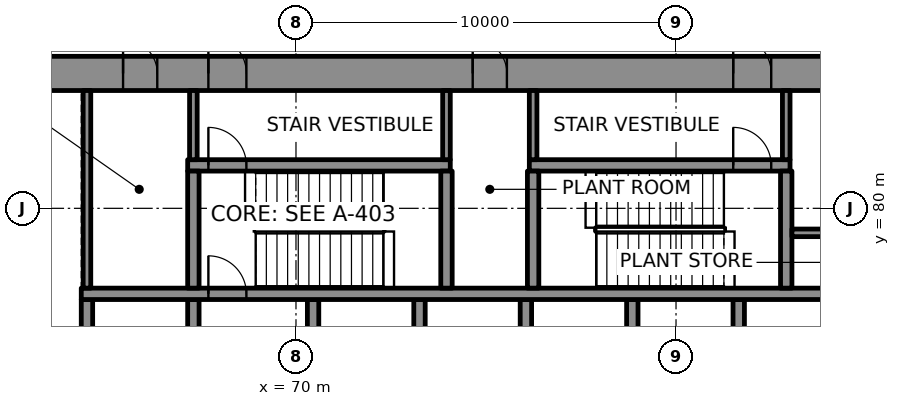
"""IFC4 building model, lengths in metres.
Left out: names, types, materials, properties, quantities, classifications, styles, units other than length and angle.
Written with IfcOpenShell. Run it as: python <this file> out.ifc"""

import sys

from ifc_helpers import new_model, si_unit, direction, frame, frame_2d, origin, place, context, subcontext, project, spatial, rectangle, extrude, element, fill, save


model = new_model("IFC4")
c1 = context("Model", 3, precision=1e-05, world=origin(), true_north=direction((0.0, 1.0)))
c2 = subcontext(c1, "Body", "Model", "MODEL_VIEW")
j1 = project(units=[si_unit("LENGTHUNIT", "METRE"), si_unit("PLANEANGLEUNIT", "RADIAN")], contexts=[c1])
p1 = place(None, origin())
s1 = spatial("IfcSite", under=j1, at=p1, CompositionType="ELEMENT")
p2 = place(p1, origin())
s2 = spatial("IfcBuilding", under=s1, at=p2, CompositionType="ELEMENT")
p3 = place(p2, frame((0.0, 0.0, 35.5)))
s3 = spatial("IfcBuildingStorey", under=s2, at=p3, CompositionType="ELEMENT", Elevation=35.5)
p4 = place(p3, frame((62.0, 83.55, 0.0), z_axis=(0.0, 0.0, 1.0), x_axis=(1.0, 0.0, 0.0)))
e1 = element("IfcWall", 1, at=p4, inside=s3, PredefinedType="SHEAR", context=c2, shape_type="SweptSolid", body=[
    extrude(rectangle(XDim=26.0, YDim=0.9, at=frame_2d((13.0, 0.0))), origin(), (0.0, 0.0, 1.0), 4.3),
])
p5 = place(p4, frame((5.695, 0.0, 0.0)))
e2 = element("IfcOpeningElement", 2, at=p5, cuts=e1, PredefinedType="OPENING", context=c2, shape_type="SweptSolid", body=[
    extrude(rectangle(XDim=1.0, YDim=2.1, at=frame_2d((0.5, 1.05))), frame((0.0, 0.46, 0.0), z_axis=(0.0, -1.0, 0.0), x_axis=(1.0, 0.0, 0.0)), (0.0, 0.0, 1.0), 0.92),
])
p6 = place(p4, frame((19.505, 0.0, 0.0)))
e3 = element("IfcOpeningElement", 3, at=p6, cuts=e1, PredefinedType="OPENING", context=c2, shape_type="SweptSolid", body=[
    extrude(rectangle(XDim=1.0, YDim=2.1, at=frame_2d((0.5, 1.05))), frame((0.0, 0.46, 0.0), z_axis=(0.0, -1.0, 0.0), x_axis=(1.0, 0.0, 0.0)), (0.0, 0.0, 1.0), 0.92),
])
p7 = place(p4, frame((3.45, 0.0, 0.0)))
e4 = element("IfcOpeningElement", 4, at=p7, cuts=e1, PredefinedType="OPENING", context=c2, shape_type="SweptSolid", body=[
    extrude(rectangle(XDim=0.9, YDim=2.1, at=frame_2d((0.45, 1.05))), frame((0.0, 0.46, 0.0), z_axis=(0.0, -1.0, 0.0), x_axis=(1.0, 0.0, 0.0)), (0.0, 0.0, 1.0), 0.92),
])
p8 = place(p4, frame((12.65, 0.0, 0.0)))
e5 = element("IfcOpeningElement", 5, at=p8, cuts=e1, PredefinedType="OPENING", context=c2, shape_type="SweptSolid", body=[
    extrude(rectangle(XDim=0.9, YDim=2.1, at=frame_2d((0.45, 1.05))), frame((0.0, 0.46, 0.0), z_axis=(0.0, -1.0, 0.0), x_axis=(1.0, 0.0, 0.0)), (0.0, 0.0, 1.0), 0.92),
])
p9 = place(p4, frame((22.55, 0.0, 0.0)))
e6 = element("IfcOpeningElement", 6, at=p9, cuts=e1, PredefinedType="OPENING", context=c2, shape_type="SweptSolid", body=[
    extrude(rectangle(XDim=0.9, YDim=2.1, at=frame_2d((0.45, 1.05))), frame((0.0, 0.46, 0.0), z_axis=(0.0, -1.0, 0.0), x_axis=(1.0, 0.0, 0.0)), (0.0, 0.0, 1.0), 0.92),
])
for number, where, z_axis, x_axis in (
    (7, (64.5, 75.0, 0.0), (0.0, 0.0, 1.0), (0.0, 1.0, 0.0)),
    (8, (67.3, 75.0, 0.0), (0.0, 0.0, 1.0), (0.0, 1.0, 0.0)),
):
    element("IfcWall", number, at=place(p3, frame(where, z_axis=z_axis, x_axis=x_axis)), inside=s3, PredefinedType="SHEAR", context=c2, shape_type="SweptSolid", body=[
        extrude(rectangle(XDim=2.6, YDim=0.3, at=frame_2d((1.3, 0.0))), origin(), (0.0, 0.0, 1.0), 4.3),
    ])
p10 = place(p3, frame((70.45, 75.0, 0.0), z_axis=(0.0, 0.0, 1.0), x_axis=(0.0, 1.0, 0.0)))
e9 = element("IfcWall", 9, at=p10, inside=s3, PredefinedType="SHEAR", context=c2, shape_type="SweptSolid", body=[
    extrude(rectangle(XDim=2.6, YDim=0.3, at=frame_2d((1.3, 0.0))), origin(), (0.0, 0.0, 1.0), 4.3),
])
p11 = place(p10, frame((0.15, 0.0, 0.0)))
e10 = element("IfcOpeningElement", 10, at=p11, cuts=e9, PredefinedType="OPENING", context=c2, shape_type="SweptSolid", body=[
    extrude(rectangle(XDim=1.1, YDim=2.1, at=frame_2d((0.55, 1.05))), frame((0.0, 0.16, 0.0), z_axis=(0.0, -1.0, 0.0), x_axis=(1.0, 0.0, 0.0)), (0.0, 0.0, 1.0), 0.32),
])
for number, where, z_axis, x_axis in (
    (11, (73.25, 75.0, 0.0), (0.0, 0.0, 1.0), (0.0, 1.0, 0.0)),
    (12, (76.05, 75.0, 0.0), (0.0, 0.0, 1.0), (0.0, 1.0, 0.0)),
    (13, (78.85, 75.0, 0.0), (0.0, 0.0, 1.0), (0.0, 1.0, 0.0)),
    (14, (81.65, 75.0, 0.0), (0.0, 0.0, 1.0), (0.0, 1.0, 0.0)),
):
    element("IfcWall", number, at=place(p3, frame(where, z_axis=z_axis, x_axis=x_axis)), inside=s3, PredefinedType="SHEAR", context=c2, shape_type="SweptSolid", body=[
        extrude(rectangle(XDim=2.6, YDim=0.3, at=frame_2d((1.3, 0.0))), origin(), (0.0, 0.0, 1.0), 4.3),
    ])
p12 = place(p3, frame((64.35, 77.75, 0.0), z_axis=(0.0, 0.0, 1.0), x_axis=(1.0, 0.0, 0.0)))
e15 = element("IfcWall", 15, at=p12, inside=s3, PredefinedType="SHEAR", context=c2, shape_type="SweptSolid", body=[
    extrude(rectangle(XDim=22.75, YDim=0.3, at=frame_2d((11.375, 0.0))), origin(), (0.0, 0.0, 1.0), 4.3),
])
p13 = place(p12, frame((3.345, 0.0, 0.0)))
e16 = element("IfcOpeningElement", 16, at=p13, cuts=e15, PredefinedType="OPENING", context=c2, shape_type="SweptSolid", body=[
    extrude(rectangle(XDim=1.0, YDim=2.1, at=frame_2d((0.5, 1.05))), frame((0.0, 0.16, 0.0), z_axis=(0.0, -1.0, 0.0), x_axis=(1.0, 0.0, 0.0)), (0.0, 0.0, 1.0), 0.32),
])
p14 = place(p3, frame((67.15, 81.13, 0.0), z_axis=(0.0, 0.0, 1.0), x_axis=(1.0, 0.0, 0.0)))
e17 = element("IfcWall", 17, at=p14, inside=s3, PredefinedType="SHEAR", context=c2, shape_type="SweptSolid", body=[
    extrude(rectangle(XDim=6.91, YDim=0.3, at=frame_2d((3.455, 0.0))), origin(), (0.0, 0.0, 1.0), 4.3),
])
p15 = place(p14, frame((0.545, 0.0, 0.0)))
e18 = element("IfcOpeningElement", 18, at=p15, cuts=e17, PredefinedType="OPENING", context=c2, shape_type="SweptSolid", body=[
    extrude(rectangle(XDim=1.0, YDim=2.1, at=frame_2d((0.5, 1.05))), frame((0.0, 0.16, 0.0), z_axis=(0.0, -1.0, 0.0), x_axis=(1.0, 0.0, 0.0)), (0.0, 0.0, 1.0), 0.32),
])
p16 = place(p3, frame((76.14, 81.13, 0.0), z_axis=(0.0, 0.0, 1.0), x_axis=(1.0, 0.0, 0.0)))
e19 = element("IfcWall", 19, at=p16, inside=s3, PredefinedType="SHEAR", context=c2, shape_type="SweptSolid", body=[
    extrude(rectangle(XDim=6.86, YDim=0.3, at=frame_2d((3.43, 0.0))), origin(), (0.0, 0.0, 1.0), 4.3),
])
p17 = place(p16, frame((5.365, 0.0, 0.0)))
e20 = element("IfcOpeningElement", 20, at=p17, cuts=e19, PredefinedType="OPENING", context=c2, shape_type="SweptSolid", body=[
    extrude(rectangle(XDim=1.0, YDim=2.1, at=frame_2d((0.5, 1.05))), frame((0.0, 0.16, 0.0), z_axis=(0.0, -1.0, 0.0), x_axis=(1.0, 0.0, 0.0)), (0.0, 0.0, 1.0), 0.32),
])
for number, where, z_axis, x_axis in (
    (21, (67.3, 77.9, 0.0), (0.0, 0.0, 1.0), (0.0, 1.0, 0.0)),
    (22, (73.96, 77.9, 0.0), (0.0, 0.0, 1.0), (0.0, 1.0, 0.0)),
    (23, (76.24, 77.9, 0.0), (0.0, 0.0, 1.0), (0.0, 1.0, 0.0)),
    (24, (82.9, 77.9, 0.0), (0.0, 0.0, 1.0), (0.0, 1.0, 0.0)),
):
    element("IfcWall", number, at=place(p3, frame(where, z_axis=z_axis, x_axis=x_axis)), inside=s3, PredefinedType="SHEAR", context=c2, shape_type="SweptSolid", body=[
        extrude(rectangle(XDim=3.08, YDim=0.3, at=frame_2d((1.54, 0.0))), origin(), (0.0, 0.0, 1.0), 4.3),
    ])
p18 = place(p3, frame((107.504, 60.451, 0.0), z_axis=(0.0, 0.0, 1.0), x_axis=(-0.500000550228, 0.86602508611, 0.0)))
e25 = element("IfcWall", 25, at=p18, inside=s3, PredefinedType="SOLIDWALL", context=c2, shape_type="SweptSolid", body=[
    extrude(rectangle(XDim=57.704, YDim=0.3, at=frame_2d((28.852, 0.0))), origin(), (0.0, 0.0, 1.0), 4.3),
])
p19 = place(p18, frame((0.89, 0.0, 0.8)))
e26 = element("IfcOpeningElement", 26, at=p19, cuts=e25, PredefinedType="OPENING", context=c2, shape_type="SweptSolid", body=[
    extrude(rectangle(XDim=3.0, YDim=2.4, at=frame_2d((1.5, 1.2))), frame((0.0, 0.16, 0.0), z_axis=(0.0, -1.0, 0.0), x_axis=(1.0, 0.0, 0.0)), (0.0, 0.0, 1.0), 0.32),
])
p20 = place(p18, frame((4.67, 0.0, 0.8)))
e27 = element("IfcOpeningElement", 27, at=p20, cuts=e25, PredefinedType="OPENING", context=c2, shape_type="SweptSolid", body=[
    extrude(rectangle(XDim=3.0, YDim=2.4, at=frame_2d((1.5, 1.2))), frame((0.0, 0.16, 0.0), z_axis=(0.0, -1.0, 0.0), x_axis=(1.0, 0.0, 0.0)), (0.0, 0.0, 1.0), 0.32),
])
p21 = place(p18, frame((8.451, 0.0, 0.8)))
e28 = element("IfcOpeningElement", 28, at=p21, cuts=e25, PredefinedType="OPENING", context=c2, shape_type="SweptSolid", body=[
    extrude(rectangle(XDim=3.0, YDim=2.4, at=frame_2d((1.5, 1.2))), frame((0.0, 0.16, 0.0), z_axis=(0.0, -1.0, 0.0), x_axis=(1.0, 0.0, 0.0)), (0.0, 0.0, 1.0), 0.32),
])
p22 = place(p18, frame((12.231, 0.0, 0.8)))
e29 = element("IfcOpeningElement", 29, at=p22, cuts=e25, PredefinedType="OPENING", context=c2, shape_type="SweptSolid", body=[
    extrude(rectangle(XDim=3.0, YDim=2.4, at=frame_2d((1.5, 1.2))), frame((0.0, 0.16, 0.0), z_axis=(0.0, -1.0, 0.0), x_axis=(1.0, 0.0, 0.0)), (0.0, 0.0, 1.0), 0.32),
])
p23 = place(p18, frame((16.011, 0.0, 0.8)))
e30 = element("IfcOpeningElement", 30, at=p23, cuts=e25, PredefinedType="OPENING", context=c2, shape_type="SweptSolid", body=[
    extrude(rectangle(XDim=3.0, YDim=2.4, at=frame_2d((1.5, 1.2))), frame((0.0, 0.16, 0.0), z_axis=(0.0, -1.0, 0.0), x_axis=(1.0, 0.0, 0.0)), (0.0, 0.0, 1.0), 0.32),
])
p24 = place(p18, frame((19.792, 0.0, 0.8)))
e31 = element("IfcOpeningElement", 31, at=p24, cuts=e25, PredefinedType="OPENING", context=c2, shape_type="SweptSolid", body=[
    extrude(rectangle(XDim=3.0, YDim=2.4, at=frame_2d((1.5, 1.2))), frame((0.0, 0.16, 0.0), z_axis=(0.0, -1.0, 0.0), x_axis=(1.0, 0.0, 0.0)), (0.0, 0.0, 1.0), 0.32),
])
p25 = place(p18, frame((23.572, 0.0, 0.8)))
e32 = element("IfcOpeningElement", 32, at=p25, cuts=e25, PredefinedType="OPENING", context=c2, shape_type="SweptSolid", body=[
    extrude(rectangle(XDim=3.0, YDim=2.4, at=frame_2d((1.5, 1.2))), frame((0.0, 0.16, 0.0), z_axis=(0.0, -1.0, 0.0), x_axis=(1.0, 0.0, 0.0)), (0.0, 0.0, 1.0), 0.32),
])
p26 = place(p18, frame((27.352, 0.0, 0.8)))
e33 = element("IfcOpeningElement", 33, at=p26, cuts=e25, PredefinedType="OPENING", context=c2, shape_type="SweptSolid", body=[
    extrude(rectangle(XDim=3.0, YDim=2.4, at=frame_2d((1.5, 1.2))), frame((0.0, 0.16, 0.0), z_axis=(0.0, -1.0, 0.0), x_axis=(1.0, 0.0, 0.0)), (0.0, 0.0, 1.0), 0.32),
])
p27 = place(p18, frame((31.132, 0.0, 0.8)))
e34 = element("IfcOpeningElement", 34, at=p27, cuts=e25, PredefinedType="OPENING", context=c2, shape_type="SweptSolid", body=[
    extrude(rectangle(XDim=3.0, YDim=2.4, at=frame_2d((1.5, 1.2))), frame((0.0, 0.16, 0.0), z_axis=(0.0, -1.0, 0.0), x_axis=(1.0, 0.0, 0.0)), (0.0, 0.0, 1.0), 0.32),
])
p28 = place(p18, frame((34.913, 0.0, 0.8)))
e35 = element("IfcOpeningElement", 35, at=p28, cuts=e25, PredefinedType="OPENING", context=c2, shape_type="SweptSolid", body=[
    extrude(rectangle(XDim=3.0, YDim=2.4, at=frame_2d((1.5, 1.2))), frame((0.0, 0.16, 0.0), z_axis=(0.0, -1.0, 0.0), x_axis=(1.0, 0.0, 0.0)), (0.0, 0.0, 1.0), 0.32),
])
p29 = place(p18, frame((38.693, 0.0, 0.8)))
e36 = element("IfcOpeningElement", 36, at=p29, cuts=e25, PredefinedType="OPENING", context=c2, shape_type="SweptSolid", body=[
    extrude(rectangle(XDim=3.0, YDim=2.4, at=frame_2d((1.5, 1.2))), frame((0.0, 0.16, 0.0), z_axis=(0.0, -1.0, 0.0), x_axis=(1.0, 0.0, 0.0)), (0.0, 0.0, 1.0), 0.32),
])
p30 = place(p18, frame((42.473, 0.0, 0.8)))
e37 = element("IfcOpeningElement", 37, at=p30, cuts=e25, PredefinedType="OPENING", context=c2, shape_type="SweptSolid", body=[
    extrude(rectangle(XDim=3.0, YDim=2.4, at=frame_2d((1.5, 1.2))), frame((0.0, 0.16, 0.0), z_axis=(0.0, -1.0, 0.0), x_axis=(1.0, 0.0, 0.0)), (0.0, 0.0, 1.0), 0.32),
])
p31 = place(p18, frame((46.253, 0.0, 0.8)))
e38 = element("IfcOpeningElement", 38, at=p31, cuts=e25, PredefinedType="OPENING", context=c2, shape_type="SweptSolid", body=[
    extrude(rectangle(XDim=3.0, YDim=2.4, at=frame_2d((1.5, 1.2))), frame((0.0, 0.16, 0.0), z_axis=(0.0, -1.0, 0.0), x_axis=(1.0, 0.0, 0.0)), (0.0, 0.0, 1.0), 0.32),
])
p32 = place(p18, frame((50.033, 0.0, 0.8)))
e39 = element("IfcOpeningElement", 39, at=p32, cuts=e25, PredefinedType="OPENING", context=c2, shape_type="SweptSolid", body=[
    extrude(rectangle(XDim=3.0, YDim=2.4, at=frame_2d((1.5, 1.2))), frame((0.0, 0.16, 0.0), z_axis=(0.0, -1.0, 0.0), x_axis=(1.0, 0.0, 0.0)), (0.0, 0.0, 1.0), 0.32),
])
p33 = place(p18, frame((53.814, 0.0, 0.8)))
e40 = element("IfcOpeningElement", 40, at=p33, cuts=e25, PredefinedType="OPENING", context=c2, shape_type="SweptSolid", body=[
    extrude(rectangle(XDim=3.0, YDim=2.4, at=frame_2d((1.5, 1.2))), frame((0.0, 0.16, 0.0), z_axis=(0.0, -1.0, 0.0), x_axis=(1.0, 0.0, 0.0)), (0.0, 0.0, 1.0), 0.32),
])
p34 = place(p3, frame((71.348, 110.424, 0.0), z_axis=(0.0, 0.0, 1.0), x_axis=(-0.500000550228, -0.86602508611, 0.0)))
e41 = element("IfcWall", 41, at=p34, inside=s3, PredefinedType="SOLIDWALL", context=c2, shape_type="SweptSolid", body=[
    extrude(rectangle(XDim=57.704, YDim=0.3, at=frame_2d((28.852, 0.0))), origin(), (0.0, 0.0, 1.0), 4.3),
])
p35 = place(p34, frame((0.89, 0.0, 0.8)))
e42 = element("IfcOpeningElement", 42, at=p35, cuts=e41, PredefinedType="OPENING", context=c2, shape_type="SweptSolid", body=[
    extrude(rectangle(XDim=3.0, YDim=2.4, at=frame_2d((1.5, 1.2))), frame((0.0, 0.16, 0.0), z_axis=(0.0, -1.0, 0.0), x_axis=(1.0, 0.0, 0.0)), (0.0, 0.0, 1.0), 0.32),
])
p36 = place(p34, frame((4.67, 0.0, 0.8)))
e43 = element("IfcOpeningElement", 43, at=p36, cuts=e41, PredefinedType="OPENING", context=c2, shape_type="SweptSolid", body=[
    extrude(rectangle(XDim=3.0, YDim=2.4, at=frame_2d((1.5, 1.2))), frame((0.0, 0.16, 0.0), z_axis=(0.0, -1.0, 0.0), x_axis=(1.0, 0.0, 0.0)), (0.0, 0.0, 1.0), 0.32),
])
p37 = place(p34, frame((8.451, 0.0, 0.8)))
e44 = element("IfcOpeningElement", 44, at=p37, cuts=e41, PredefinedType="OPENING", context=c2, shape_type="SweptSolid", body=[
    extrude(rectangle(XDim=3.0, YDim=2.4, at=frame_2d((1.5, 1.2))), frame((0.0, 0.16, 0.0), z_axis=(0.0, -1.0, 0.0), x_axis=(1.0, 0.0, 0.0)), (0.0, 0.0, 1.0), 0.32),
])
p38 = place(p34, frame((12.231, 0.0, 0.8)))
e45 = element("IfcOpeningElement", 45, at=p38, cuts=e41, PredefinedType="OPENING", context=c2, shape_type="SweptSolid", body=[
    extrude(rectangle(XDim=3.0, YDim=2.4, at=frame_2d((1.5, 1.2))), frame((0.0, 0.16, 0.0), z_axis=(0.0, -1.0, 0.0), x_axis=(1.0, 0.0, 0.0)), (0.0, 0.0, 1.0), 0.32),
])
p39 = place(p34, frame((16.011, 0.0, 0.8)))
e46 = element("IfcOpeningElement", 46, at=p39, cuts=e41, PredefinedType="OPENING", context=c2, shape_type="SweptSolid", body=[
    extrude(rectangle(XDim=3.0, YDim=2.4, at=frame_2d((1.5, 1.2))), frame((0.0, 0.16, 0.0), z_axis=(0.0, -1.0, 0.0), x_axis=(1.0, 0.0, 0.0)), (0.0, 0.0, 1.0), 0.32),
])
p40 = place(p34, frame((19.792, 0.0, 0.8)))
e47 = element("IfcOpeningElement", 47, at=p40, cuts=e41, PredefinedType="OPENING", context=c2, shape_type="SweptSolid", body=[
    extrude(rectangle(XDim=3.0, YDim=2.4, at=frame_2d((1.5, 1.2))), frame((0.0, 0.16, 0.0), z_axis=(0.0, -1.0, 0.0), x_axis=(1.0, 0.0, 0.0)), (0.0, 0.0, 1.0), 0.32),
])
p41 = place(p34, frame((23.572, 0.0, 0.8)))
e48 = element("IfcOpeningElement", 48, at=p41, cuts=e41, PredefinedType="OPENING", context=c2, shape_type="SweptSolid", body=[
    extrude(rectangle(XDim=3.0, YDim=2.4, at=frame_2d((1.5, 1.2))), frame((0.0, 0.16, 0.0), z_axis=(0.0, -1.0, 0.0), x_axis=(1.0, 0.0, 0.0)), (0.0, 0.0, 1.0), 0.32),
])
p42 = place(p34, frame((27.352, 0.0, 0.8)))
e49 = element("IfcOpeningElement", 49, at=p42, cuts=e41, PredefinedType="OPENING", context=c2, shape_type="SweptSolid", body=[
    extrude(rectangle(XDim=3.0, YDim=2.4, at=frame_2d((1.5, 1.2))), frame((0.0, 0.16, 0.0), z_axis=(0.0, -1.0, 0.0), x_axis=(1.0, 0.0, 0.0)), (0.0, 0.0, 1.0), 0.32),
])
p43 = place(p34, frame((31.132, 0.0, 0.8)))
e50 = element("IfcOpeningElement", 50, at=p43, cuts=e41, PredefinedType="OPENING", context=c2, shape_type="SweptSolid", body=[
    extrude(rectangle(XDim=3.0, YDim=2.4, at=frame_2d((1.5, 1.2))), frame((0.0, 0.16, 0.0), z_axis=(0.0, -1.0, 0.0), x_axis=(1.0, 0.0, 0.0)), (0.0, 0.0, 1.0), 0.32),
])
p44 = place(p34, frame((34.913, 0.0, 0.8)))
e51 = element("IfcOpeningElement", 51, at=p44, cuts=e41, PredefinedType="OPENING", context=c2, shape_type="SweptSolid", body=[
    extrude(rectangle(XDim=3.0, YDim=2.4, at=frame_2d((1.5, 1.2))), frame((0.0, 0.16, 0.0), z_axis=(0.0, -1.0, 0.0), x_axis=(1.0, 0.0, 0.0)), (0.0, 0.0, 1.0), 0.32),
])
p45 = place(p34, frame((38.693, 0.0, 0.8)))
e52 = element("IfcOpeningElement", 52, at=p45, cuts=e41, PredefinedType="OPENING", context=c2, shape_type="SweptSolid", body=[
    extrude(rectangle(XDim=3.0, YDim=2.4, at=frame_2d((1.5, 1.2))), frame((0.0, 0.16, 0.0), z_axis=(0.0, -1.0, 0.0), x_axis=(1.0, 0.0, 0.0)), (0.0, 0.0, 1.0), 0.32),
])
p46 = place(p34, frame((42.473, 0.0, 0.8)))
e53 = element("IfcOpeningElement", 53, at=p46, cuts=e41, PredefinedType="OPENING", context=c2, shape_type="SweptSolid", body=[
    extrude(rectangle(XDim=3.0, YDim=2.4, at=frame_2d((1.5, 1.2))), frame((0.0, 0.16, 0.0), z_axis=(0.0, -1.0, 0.0), x_axis=(1.0, 0.0, 0.0)), (0.0, 0.0, 1.0), 0.32),
])
p47 = place(p34, frame((46.253, 0.0, 0.8)))
e54 = element("IfcOpeningElement", 54, at=p47, cuts=e41, PredefinedType="OPENING", context=c2, shape_type="SweptSolid", body=[
    extrude(rectangle(XDim=3.0, YDim=2.4, at=frame_2d((1.5, 1.2))), frame((0.0, 0.16, 0.0), z_axis=(0.0, -1.0, 0.0), x_axis=(1.0, 0.0, 0.0)), (0.0, 0.0, 1.0), 0.32),
])
p48 = place(p34, frame((50.033, 0.0, 0.8)))
e55 = element("IfcOpeningElement", 55, at=p48, cuts=e41, PredefinedType="OPENING", context=c2, shape_type="SweptSolid", body=[
    extrude(rectangle(XDim=3.0, YDim=2.4, at=frame_2d((1.5, 1.2))), frame((0.0, 0.16, 0.0), z_axis=(0.0, -1.0, 0.0), x_axis=(1.0, 0.0, 0.0)), (0.0, 0.0, 1.0), 0.32),
])
p49 = place(p34, frame((53.814, 0.0, 0.8)))
e56 = element("IfcOpeningElement", 56, at=p49, cuts=e41, PredefinedType="OPENING", context=c2, shape_type="SweptSolid", body=[
    extrude(rectangle(XDim=3.0, YDim=2.4, at=frame_2d((1.5, 1.2))), frame((0.0, 0.16, 0.0), z_axis=(0.0, -1.0, 0.0), x_axis=(1.0, 0.0, 0.0)), (0.0, 0.0, 1.0), 0.32),
])
p50 = place(p3, frame((83.05, 79.355, 0.0), z_axis=(0.0, 0.0, 1.0), x_axis=(1.0, 0.0, 0.0)))
e57 = element("IfcWall", 57, at=p50, inside=s3, PredefinedType="PARTITIONING", context=c2, shape_type="SweptSolid", body=[
    extrude(rectangle(XDim=4.05, YDim=0.2, at=frame_2d((2.025, 0.0))), origin(), (0.0, 0.0, 1.0), 4.3),
])
p51 = place(p3, frame((64.5, 77.9, 0.0), z_axis=(0.0, 0.0, 1.0), x_axis=(0.0, 1.0, 0.0)))
e58 = element("IfcWall", 58, at=p51, inside=s3, PredefinedType="PARTITIONING", context=c2, shape_type="SweptSolid", body=[
    extrude(rectangle(XDim=5.2, YDim=0.2, at=frame_2d((2.6, 0.0))), origin(), (0.0, 0.0, 1.0), 4.3),
])
for number, where, z_axis, x_axis in (
    (59, (67.3, 81.28, 0.0), (0.0, 0.0, 1.0), (0.0, 1.0, 0.0)),
    (60, (73.96, 81.28, 0.0), (0.0, 0.0, 1.0), (0.0, 1.0, 0.0)),
    (61, (76.24, 81.28, 0.0), (0.0, 0.0, 1.0), (0.0, 1.0, 0.0)),
    (62, (82.9, 81.28, 0.0), (0.0, 0.0, 1.0), (0.0, 1.0, 0.0)),
):
    element("IfcWall", number, at=place(p3, frame(where, z_axis=z_axis, x_axis=x_axis)), inside=s3, PredefinedType="PARTITIONING", context=c2, shape_type="SweptSolid", body=[
        extrude(rectangle(XDim=1.82, YDim=0.2, at=frame_2d((0.91, 0.0))), origin(), (0.0, 0.0, 1.0), 4.3),
    ])
p52 = place(p13, origin())
e63 = element("IfcDoor", 63, at=p52, inside=s3, OperationType="SINGLE_SWING_LEFT", PredefinedType="DOOR", context=c2, shape_type="SweptSolid", body=[
    extrude(rectangle(XDim=1.0, YDim=2.1, at=frame_2d((0.5, 1.05))), frame((0.0, 0.025, 0.0), z_axis=(0.0, -1.0, 0.0), x_axis=(1.0, 0.0, 0.0)), (0.0, 0.0, 1.0), 0.05),
])
fill(e16, e63)
p53 = place(p15, origin())
e64 = element("IfcDoor", 64, at=p53, inside=s3, OperationType="SINGLE_SWING_RIGHT", PredefinedType="DOOR", context=c2, shape_type="SweptSolid", body=[
    extrude(rectangle(XDim=1.0, YDim=2.1, at=frame_2d((0.5, 1.05))), frame((0.0, 0.025, 0.0), z_axis=(0.0, -1.0, 0.0), x_axis=(1.0, 0.0, 0.0)), (0.0, 0.0, 1.0), 0.05),
])
fill(e18, e64)
p54 = place(p5, origin())
e65 = element("IfcDoor", 65, at=p54, inside=s3, OperationType="SINGLE_SWING_LEFT", PredefinedType="DOOR", context=c2, shape_type="SweptSolid", body=[
    extrude(rectangle(XDim=1.0, YDim=2.1, at=frame_2d((0.5, 1.05))), frame((0.0, 0.17, 0.0), z_axis=(0.0, -1.0, 0.0), x_axis=(1.0, 0.0, 0.0)), (0.0, 0.0, 1.0), 0.34),
])
fill(e2, e65)
p55 = place(p17, origin())
e66 = element("IfcDoor", 66, at=p55, inside=s3, OperationType="SINGLE_SWING_RIGHT", PredefinedType="DOOR", context=c2, shape_type="SweptSolid", body=[
    extrude(rectangle(XDim=1.0, YDim=2.1, at=frame_2d((0.5, 1.05))), frame((0.0, 0.025, 0.0), z_axis=(0.0, -1.0, 0.0), x_axis=(1.0, 0.0, 0.0)), (0.0, 0.0, 1.0), 0.05),
])
fill(e20, e66)
p56 = place(p6, origin())
e67 = element("IfcDoor", 67, at=p56, inside=s3, OperationType="SINGLE_SWING_LEFT", PredefinedType="DOOR", context=c2, shape_type="SweptSolid", body=[
    extrude(rectangle(XDim=1.0, YDim=2.1, at=frame_2d((0.5, 1.05))), frame((0.0, 0.17, 0.0), z_axis=(0.0, -1.0, 0.0), x_axis=(1.0, 0.0, 0.0)), (0.0, 0.0, 1.0), 0.34),
])
fill(e3, e67)
p57 = place(p7, origin())
e68 = element("IfcDoor", 68, at=p57, inside=s3, OperationType="SINGLE_SWING_RIGHT", PredefinedType="DOOR", context=c2, shape_type="SweptSolid", body=[
    extrude(rectangle(XDim=0.9, YDim=2.1, at=frame_2d((0.45, 1.05))), frame((0.0, 0.17, 0.0), z_axis=(0.0, -1.0, 0.0), x_axis=(1.0, 0.0, 0.0)), (0.0, 0.0, 1.0), 0.34),
])
fill(e4, e68)
p58 = place(p8, origin())
e69 = element("IfcDoor", 69, at=p58, inside=s3, OperationType="SINGLE_SWING_LEFT", PredefinedType="DOOR", context=c2, shape_type="SweptSolid", body=[
    extrude(rectangle(XDim=0.9, YDim=2.1, at=frame_2d((0.45, 1.05))), frame((0.0, 0.17, 0.0), z_axis=(0.0, -1.0, 0.0), x_axis=(1.0, 0.0, 0.0)), (0.0, 0.0, 1.0), 0.34),
])
fill(e5, e69)
save(model, sys.argv[1])
